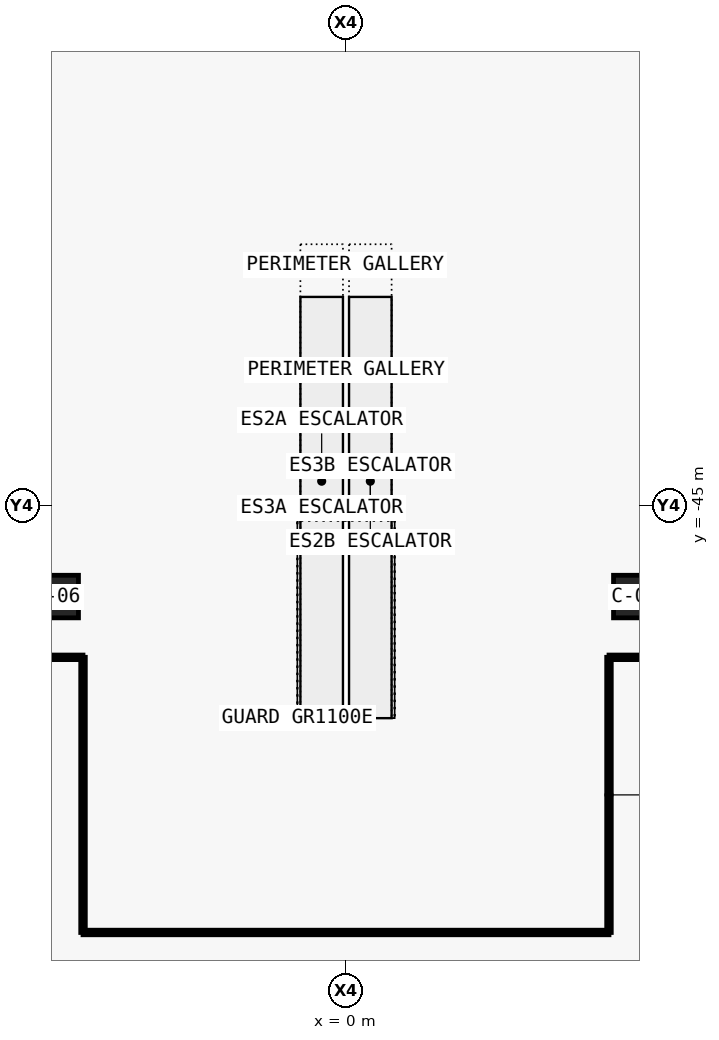
"""IFC4 building model, lengths in metres.
Left out: names, types, materials, properties, quantities, classifications, styles, units other than length and angle.
Written with IfcOpenShell. Run it as: python <this file> out.ifc"""

import sys

from ifc_helpers import new_model, si_unit, direction, frame, frame_2d, origin, origin_2d, place, context, subcontext, project, spatial, rectangle, extrude, element, save


model = new_model("IFC4")
c1 = context("Model", 3, precision=1e-05, world=origin(), true_north=direction((0.0, 1.0)))
c2 = subcontext(c1, "Body", "Model", "MODEL_VIEW")
j1 = project(units=[si_unit("LENGTHUNIT", "METRE"), si_unit("PLANEANGLEUNIT", "RADIAN")], contexts=[c1])
p1 = place(None, origin())
s1 = spatial("IfcSite", under=j1, at=p1, CompositionType="ELEMENT")
p2 = place(p1, origin())
s2 = spatial("IfcBuilding", under=s1, at=p2, CompositionType="ELEMENT")
p3 = place(p2, frame((0.0, 0.0, 18.0)))
s3 = spatial("IfcBuildingStorey", under=s2, at=p3, CompositionType="ELEMENT", Elevation=18.0)
for number, where, z_axis, x_axis in (
    (1, (-9.5, -48.0, 0.0), (0.0, 0.0, 1.0), (1.0, 0.0, 0.0)),
    (2, (9.5, -48.0, 0.0), (0.0, 0.0, 1.0), (1.0, 0.0, 0.0)),
):
    element("IfcColumn", number, at=place(p3, frame(where, z_axis=z_axis, x_axis=x_axis)), inside=s3, PredefinedType="COLUMN", context=c2, shape_type="SweptSolid", body=[
        extrude(rectangle(XDim=1.4, YDim=1.4, at=origin_2d()), origin(), (0.0, 0.0, 1.0), 8.0),
    ])
for number, where, z_axis, x_axis in (
    (3, (30.0, -49.999, 0.0), (0.0, 0.0, 1.0), (-1.0, 0.0, 0.0)),
    (4, (-8.651, -49.999, 0.0), (0.0, 0.0, 1.0), (-1.0, 0.0, 0.0)),
):
    element("IfcWall", number, at=place(p3, frame(where, z_axis=z_axis, x_axis=x_axis)), inside=s3, PredefinedType="PARTITIONING", context=c2, shape_type="SweptSolid", body=[
        extrude(rectangle(XDim=21.349, YDim=0.15, at=frame_2d((10.675, 0.0))), origin(), (0.0, 0.0, 1.0), 6.58),
    ])
p4 = place(p3, frame((-30.839, -34.413, 0.0), z_axis=(0.0, 0.0, 1.0), x_axis=(0.819150779762, 0.573578242279, 0.0)))
e5 = element("IfcWall", 5, at=p4, inside=s3, PredefinedType="PARTITIONING", context=c2, shape_type="SweptSolid", body=[
    extrude(rectangle(XDim=27.002, YDim=0.15, at=frame_2d((13.501, 0.0))), origin(), (0.0, 0.0, 1.0), 6.58),
])
p5 = place(p3, frame((8.65, -59.05, 0.0), z_axis=(0.0, 0.0, 1.0), x_axis=(-1.0, 0.0, 0.0)))
e6 = element("IfcWall", 6, at=p5, inside=s3, PredefinedType="PARTITIONING", context=c2, shape_type="SweptSolid", body=[
    extrude(rectangle(XDim=17.3, YDim=0.15, at=frame_2d((8.65, 0.0))), origin(), (0.0, 0.0, 1.0), 7.6),
])
for number, where, z_axis, x_axis in (
    (7, (-8.65, -59.05, 0.0), (0.0, 0.0, 1.0), (0.0, 1.0, 0.0)),
    (8, (8.65, -49.998, 0.0), (0.0, 0.0, 1.0), (0.0, -1.0, 0.0)),
):
    element("IfcWall", number, at=place(p3, frame(where, z_axis=z_axis, x_axis=x_axis)), inside=s3, PredefinedType="PARTITIONING", context=c2, shape_type="SweptSolid", body=[
        extrude(rectangle(XDim=9.052, YDim=0.15, at=frame_2d((4.526, 0.0))), origin(), (0.0, 0.0, 1.0), 6.98),
    ])
save(model, sys.argv[1])
